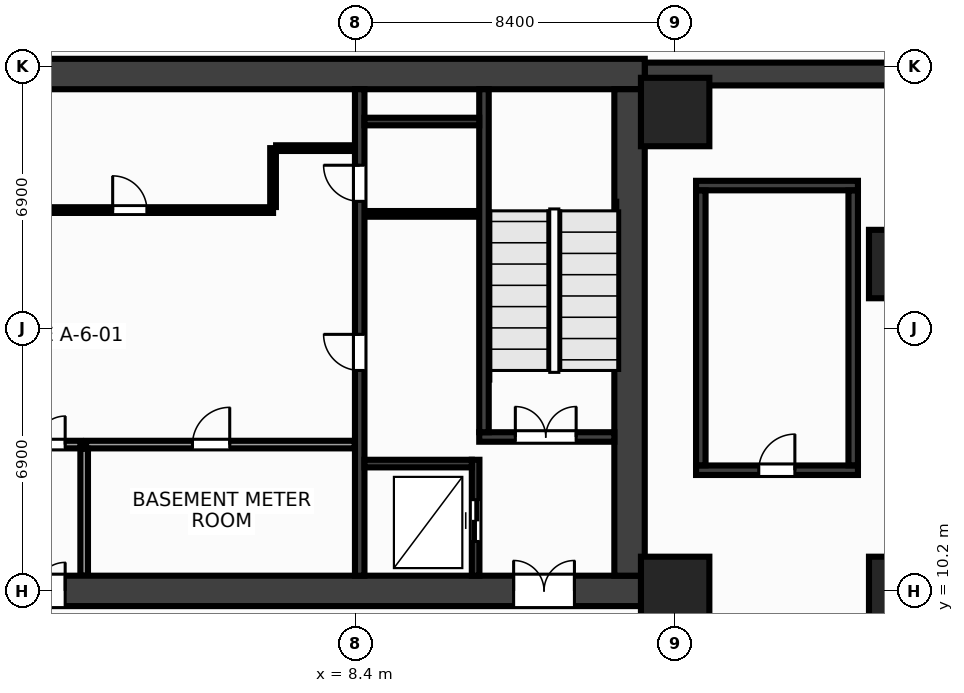
"""IFC4 building model, lengths in metres.
Left out: names, types, materials, properties, quantities, classifications, styles, units other than length and angle.
Written with IfcOpenShell. Run it as: python <this file> out.ifc"""

import sys

from ifc_helpers import new_model, si_unit, direction, frame, frame_2d, origin, origin_2d, place, context, subcontext, project, spatial, rectangle, extrude, source, transform, mapped, element, fill, save


model = new_model("IFC4")
c1 = context("Model", 3, precision=1e-05, world=origin(), true_north=direction((0.0, 1.0)))
c2 = subcontext(c1, "Body", "Model", "MODEL_VIEW")
j1 = project(units=[si_unit("LENGTHUNIT", "METRE"), si_unit("PLANEANGLEUNIT", "RADIAN")], contexts=[c1])
p1 = place(None, origin())
s1 = spatial("IfcSite", under=j1, at=p1, CompositionType="ELEMENT")
p2 = place(p1, origin())
s2 = spatial("IfcBuilding", under=s1, at=p2, CompositionType="ELEMENT")
p3 = place(p2, frame((0.0, 0.0, -11.0)))
s3 = spatial("IfcBuildingStorey", under=s2, at=p3, CompositionType="ELEMENT", Elevation=-11.0)
m1 = source(origin(), c2, "Body", "SweptSolid", [
    extrude(rectangle(XDim=22.9, YDim=0.6, at=frame_2d((11.45, 0.0))), origin(), (0.0, 0.0, 1.0), 5.5),
])
p4 = place(p3, frame((16.0, 23.8, 0.0), z_axis=(0.0, 0.0, 1.0), x_axis=(1.0, 0.0, 0.0)))
e1 = element("IfcWall", 1, at=p4, inside=s3, PredefinedType="SHEAR", context=c2, shape_type="MappedRepresentation", body=[
    mapped(m1, transform((0.0, 0.0, 0.0), x_axis=(1.0, 0.0, 0.0), y_axis=(0.0, 1.0, 0.0), z_axis=(0.0, 0.0, 1.0), scale=1.0)),
])
m2 = source(origin(), c2, "Body", "SweptSolid", [
    extrude(rectangle(XDim=32.0, YDim=0.8, at=frame_2d((16.0, 0.0))), origin(), (0.0, 0.0, 1.0), 5.5),
])
p5 = place(p3, frame((-16.0, 23.8, 0.0), z_axis=(0.0, 0.0, 1.0), x_axis=(1.0, 0.0, 0.0)))
e2 = element("IfcWall", 2, at=p5, inside=s3, PredefinedType="SHEAR", context=c2, shape_type="MappedRepresentation", body=[
    mapped(m2, transform((0.0, 0.0, 0.0), x_axis=(1.0, 0.0, 0.0), y_axis=(0.0, 1.0, 0.0), z_axis=(0.0, 0.0, 1.0), scale=1.0)),
])
p6 = place(p3, frame((-16.0, 10.2, 0.0), z_axis=(0.0, 0.0, 1.0), x_axis=(1.0, 0.0, 0.0)))
e3 = element("IfcWall", 3, at=p6, inside=s3, PredefinedType="SHEAR", context=c2, shape_type="MappedRepresentation", body=[
    mapped(m2, transform((0.0, 0.0, 0.0), x_axis=(1.0, 0.0, 0.0), y_axis=(0.0, 1.0, 0.0), z_axis=(0.0, 0.0, 1.0), scale=1.0)),
])
p7 = place(p6, frame((1.85, 0.0, 0.0)))
e4 = element("IfcOpeningElement", 4, at=p7, cuts=e3, PredefinedType="OPENING", context=c2, shape_type="SweptSolid", body=[
    extrude(rectangle(XDim=1.6, YDim=2.15, at=frame_2d((0.8, 1.075))), frame((0.0, 0.412, 0.0), z_axis=(0.0, -1.0, 0.0), x_axis=(1.0, 0.0, 0.0)), (0.0, 0.0, 1.0), 0.824),
])
p8 = place(p6, frame((28.55, 0.0, 0.0)))
e5 = element("IfcOpeningElement", 5, at=p8, cuts=e3, PredefinedType="OPENING", context=c2, shape_type="SweptSolid", body=[
    extrude(rectangle(XDim=1.6, YDim=2.15, at=frame_2d((0.8, 1.075))), frame((0.0, 0.412, 0.0), z_axis=(0.0, -1.0, 0.0), x_axis=(1.0, 0.0, 0.0)), (0.0, 0.0, 1.0), 0.824),
])
p9 = place(p6, frame((15.25, 0.0, 0.0)))
e6 = element("IfcOpeningElement", 6, at=p9, cuts=e3, PredefinedType="OPENING", context=c2, shape_type="SweptSolid", body=[
    extrude(rectangle(XDim=1.5, YDim=2.2, at=frame_2d((0.75, 1.1))), frame((0.0, 0.412, 0.0), z_axis=(0.0, -1.0, 0.0), x_axis=(1.0, 0.0, 0.0)), (0.0, 0.0, 1.0), 0.824),
])
m3 = source(origin(), c2, "Body", "SweptSolid", [
    extrude(rectangle(XDim=12.8, YDim=0.8, at=frame_2d((6.4, 0.0))), origin(), (0.0, 0.0, 1.0), 5.5),
])
p10 = place(p3, frame((15.6, 10.6, 0.0), z_axis=(0.0, 0.0, 1.0), x_axis=(0.0, 1.0, 0.0)))
e7 = element("IfcWall", 7, at=p10, inside=s3, PredefinedType="SHEAR", context=c2, shape_type="MappedRepresentation", body=[
    mapped(m3, transform((0.0, 0.0, 0.0), x_axis=(1.0, 0.0, 0.0), y_axis=(0.0, 1.0, 0.0), z_axis=(0.0, 0.0, 1.0), scale=1.0)),
])
m4 = source(origin(), c2, "Body", "SweptSolid", [
    extrude(rectangle(XDim=12.8, YDim=0.25, at=frame_2d((6.4, 0.0))), origin(), (0.0, 0.0, 1.0), 5.5),
])
p11 = place(p3, frame((8.5, 10.6, 0.0), z_axis=(0.0, 0.0, 1.0), x_axis=(0.0, 1.0, 0.0)))
e8 = element("IfcWall", 8, at=p11, inside=s3, PredefinedType="SHEAR", context=c2, shape_type="MappedRepresentation", body=[
    mapped(m4, transform((0.0, 0.0, 0.0), x_axis=(1.0, 0.0, 0.0), y_axis=(0.0, 1.0, 0.0), z_axis=(0.0, 0.0, 1.0), scale=1.0)),
])
p12 = place(p11, frame((5.4, 0.0, 0.0)))
e9 = element("IfcOpeningElement", 9, at=p12, cuts=e8, PredefinedType="OPENING", context=c2, shape_type="SweptSolid", body=[
    extrude(rectangle(XDim=0.95, YDim=2.15, at=frame_2d((0.475, 1.075))), frame((0.0, 0.137, 0.0), z_axis=(0.0, -1.0, 0.0), x_axis=(1.0, 0.0, 0.0)), (0.0, 0.0, 1.0), 0.274),
])
p13 = place(p11, frame((9.85, 0.0, 0.0)))
e10 = element("IfcOpeningElement", 10, at=p13, cuts=e8, PredefinedType="OPENING", context=c2, shape_type="SweptSolid", body=[
    extrude(rectangle(XDim=0.95, YDim=2.15, at=frame_2d((0.475, 1.075))), frame((0.0, 0.137, 0.0), z_axis=(0.0, -1.0, 0.0), x_axis=(1.0, 0.0, 0.0)), (0.0, 0.0, 1.0), 0.274),
])
m5 = source(origin(), c2, "Body", "SweptSolid", [
    extrude(rectangle(XDim=3.555, YDim=0.25, at=frame_2d((1.777, 0.0))), origin(), (0.0, 0.0, 1.0), 5.5),
])
p14 = place(p3, frame((11.645, 14.25, 0.0), z_axis=(0.0, 0.0, 1.0), x_axis=(1.0, 0.0, 0.0)))
e11 = element("IfcWall", 11, at=p14, inside=s3, PredefinedType="SHEAR", context=c2, shape_type="MappedRepresentation", body=[
    mapped(m5, transform((0.0, 0.0, 0.0), x_axis=(1.0, 0.0, 0.0), y_axis=(0.0, 1.0, 0.0), z_axis=(0.0, 0.0, 1.0), scale=1.0)),
])
p15 = place(p14, frame((0.95, 0.0, 0.0)))
e12 = element("IfcOpeningElement", 12, at=p15, cuts=e11, PredefinedType="OPENING", context=c2, shape_type="SweptSolid", body=[
    extrude(rectangle(XDim=1.6, YDim=2.15, at=frame_2d((0.8, 1.075))), frame((0.0, 0.137, 0.0), z_axis=(0.0, -1.0, 0.0), x_axis=(1.0, 0.0, 0.0)), (0.0, 0.0, 1.0), 0.274),
])
m6 = source(origin(), c2, "Body", "SweptSolid", [
    extrude(rectangle(XDim=9.025, YDim=0.25, at=frame_2d((4.512, 0.0))), origin(), (0.0, 0.0, 1.0), 5.5),
])
p16 = place(p3, frame((11.77, 14.375, 0.0), z_axis=(0.0, 0.0, 1.0), x_axis=(0.0, 1.0, 0.0)))
e13 = element("IfcWall", 13, at=p16, inside=s3, PredefinedType="SHEAR", context=c2, shape_type="MappedRepresentation", body=[
    mapped(m6, transform((0.0, 0.0, 0.0), x_axis=(1.0, 0.0, 0.0), y_axis=(0.0, 1.0, 0.0), z_axis=(0.0, 0.0, 1.0), scale=1.0)),
])
m7 = source(origin(), c2, "Body", "SweptSolid", [
    extrude(rectangle(XDim=3.05, YDim=0.2, at=frame_2d((1.525, 0.0))), origin(), (0.0, 0.0, 1.0), 5.5),
])
p17 = place(p3, frame((11.55, 10.6, 0.0), z_axis=(0.0, 0.0, 1.0), x_axis=(0.0, 1.0, 0.0)))
e14 = element("IfcWall", 14, at=p17, inside=s3, PredefinedType="SHEAR", context=c2, shape_type="MappedRepresentation", body=[
    mapped(m7, transform((0.0, 0.0, 0.0), x_axis=(1.0, 0.0, 0.0), y_axis=(0.0, 1.0, 0.0), z_axis=(0.0, 0.0, 1.0), scale=1.0)),
])
p18 = place(p17, frame((0.9, 0.0, 0.0)))
e15 = element("IfcOpeningElement", 15, at=p18, cuts=e14, PredefinedType="OPENING", context=c2, shape_type="SweptSolid", body=[
    extrude(rectangle(XDim=1.1, YDim=2.15, at=frame_2d((0.55, 1.075))), frame((0.0, 0.112, 0.0), z_axis=(0.0, -1.0, 0.0), x_axis=(1.0, 0.0, 0.0)), (0.0, 0.0, 1.0), 0.224),
])
m8 = source(origin(), c2, "Body", "SweptSolid", [
    extrude(rectangle(XDim=2.825, YDim=0.2, at=frame_2d((1.413, 0.0))), origin(), (0.0, 0.0, 1.0), 5.5),
])
p19 = place(p3, frame((8.625, 13.55, 0.0), z_axis=(0.0, 0.0, 1.0), x_axis=(1.0, 0.0, 0.0)))
e16 = element("IfcWall", 16, at=p19, inside=s3, PredefinedType="SHEAR", context=c2, shape_type="MappedRepresentation", body=[
    mapped(m8, transform((0.0, 0.0, 0.0), x_axis=(1.0, 0.0, 0.0), y_axis=(0.0, 1.0, 0.0), z_axis=(0.0, 0.0, 1.0), scale=1.0)),
])
m9 = source(origin(), c2, "Body", "SweptSolid", [
    extrude(rectangle(XDim=3.02, YDim=0.2, at=frame_2d((1.51, 0.0))), origin(), (0.0, 0.0, 1.0), 5.5),
])
p20 = place(p3, frame((8.625, 22.55, 0.0), z_axis=(0.0, 0.0, 1.0), x_axis=(1.0, 0.0, 0.0)))
e17 = element("IfcWall", 17, at=p20, inside=s3, PredefinedType="SHEAR", context=c2, shape_type="MappedRepresentation", body=[
    mapped(m9, transform((0.0, 0.0, 0.0), x_axis=(1.0, 0.0, 0.0), y_axis=(0.0, 1.0, 0.0), z_axis=(0.0, 0.0, 1.0), scale=1.0)),
])
m10 = source(origin(), c2, "Body", "SweptSolid", [
    extrude(rectangle(XDim=4.26, YDim=0.25, at=frame_2d((2.13, 0.0))), origin(), (0.0, 0.0, 1.0), 5.5),
])
p21 = place(p3, frame((17.35, 20.865, 0.0), z_axis=(0.0, 0.0, 1.0), x_axis=(1.0, 0.0, 0.0)))
e18 = element("IfcWall", 18, at=p21, inside=s3, PredefinedType="SHEAR", context=c2, shape_type="MappedRepresentation", body=[
    mapped(m10, transform((0.0, 0.0, 0.0), x_axis=(1.0, 0.0, 0.0), y_axis=(0.0, 1.0, 0.0), z_axis=(0.0, 0.0, 1.0), scale=1.0)),
])
p22 = place(p3, frame((17.35, 13.375, 0.0), z_axis=(0.0, 0.0, 1.0), x_axis=(1.0, 0.0, 0.0)))
e19 = element("IfcWall", 19, at=p22, inside=s3, PredefinedType="SHEAR", context=c2, shape_type="MappedRepresentation", body=[
    mapped(m10, transform((0.0, 0.0, 0.0), x_axis=(1.0, 0.0, 0.0), y_axis=(0.0, 1.0, 0.0), z_axis=(0.0, 0.0, 1.0), scale=1.0)),
])
p23 = place(p22, frame((1.65, 0.0, 0.0)))
e20 = element("IfcOpeningElement", 20, at=p23, cuts=e19, PredefinedType="OPENING", context=c2, shape_type="SweptSolid", body=[
    extrude(rectangle(XDim=0.95, YDim=2.15, at=frame_2d((0.475, 1.075))), frame((0.0, 0.137, 0.0), z_axis=(0.0, -1.0, 0.0), x_axis=(1.0, 0.0, 0.0)), (0.0, 0.0, 1.0), 0.274),
])
m11 = source(origin(), c2, "Body", "SweptSolid", [
    extrude(rectangle(XDim=7.23, YDim=0.25, at=frame_2d((3.615, 0.0))), origin(), (0.0, 0.0, 1.0), 5.5),
])
for number, where, z_axis, x_axis in (
    (21, (17.475, 13.505, 0.0), (0.0, 0.0, 1.0), (0.0, 1.0, 0.0)),
    (22, (21.485, 13.505, 0.0), (0.0, 0.0, 1.0), (0.0, 1.0, 0.0)),
):
    element("IfcWall", number, at=place(p3, frame(where, z_axis=z_axis, x_axis=x_axis)), inside=s3, PredefinedType="SHEAR", context=c2, shape_type="MappedRepresentation", body=[
        mapped(m11, transform((0.0, 0.0, 0.0), x_axis=(1.0, 0.0, 0.0), y_axis=(0.0, 1.0, 0.0), z_axis=(0.0, 0.0, 1.0), scale=1.0)),
    ])
m12 = source(origin(), c2, "Body", "SweptSolid", [
    extrude(rectangle(XDim=1.8, YDim=1.8, at=origin_2d()), origin(), (0.0, 0.0, 1.0), 5.5),
])
for number, where, z_axis, x_axis in (
    (23, (16.8, 10.2, 0.0), (0.0, 0.0, 1.0), (1.0, 0.0, 0.0)),
    (24, (16.8, 22.8, 0.0), (0.0, 0.0, 1.0), (1.0, 0.0, 0.0)),
    (25, (22.8, 10.2, 0.0), (0.0, 0.0, 1.0), (1.0, 0.0, 0.0)),
    (26, (22.8, 18.8, 0.0), (0.0, 0.0, 1.0), (1.0, 0.0, 0.0)),
):
    element("IfcColumn", number, at=place(p3, frame(where, z_axis=z_axis, x_axis=x_axis)), inside=s3, PredefinedType="COLUMN", context=c2, shape_type="MappedRepresentation", body=[
        mapped(m12, transform((0.0, 0.0, 0.0), x_axis=(1.0, 0.0, 0.0), y_axis=(0.0, 1.0, 0.0), z_axis=(0.0, 0.0, 1.0), scale=1.0)),
    ])
m13 = source(origin(), c2, "Body", "SweptSolid", [
    extrude(rectangle(XDim=3.01, YDim=0.15, at=frame_2d((1.505, 0.0))), origin(), (0.0, 0.0, 1.0), 5.15),
])
p24 = place(p3, frame((8.63, 20.12, 0.0), z_axis=(0.0, 0.0, 1.0), x_axis=(1.0, 0.0, 0.0)))
e27 = element("IfcWall", 27, at=p24, inside=s3, PredefinedType="PARTITIONING", context=c2, shape_type="MappedRepresentation", body=[
    mapped(m13, transform((0.0, 0.0, 0.0), x_axis=(1.0, 0.0, 0.0), y_axis=(0.0, 1.0, 0.0), z_axis=(0.0, 0.0, 1.0), scale=1.0)),
])
m14 = source(origin(), c2, "Body", "SweptSolid", [
    extrude(rectangle(XDim=7.07, YDim=0.2, at=frame_2d((3.535, 0.0))), origin(), (0.0, 0.0, 1.0), 5.15),
])
p25 = place(p3, frame((1.3, 14.05, 0.0), z_axis=(0.0, 0.0, 1.0), x_axis=(1.0, 0.0, 0.0)))
e28 = element("IfcWall", 28, at=p25, inside=s3, PredefinedType="PARTITIONING", context=c2, shape_type="MappedRepresentation", body=[
    mapped(m14, transform((0.0, 0.0, 0.0), x_axis=(1.0, 0.0, 0.0), y_axis=(0.0, 1.0, 0.0), z_axis=(0.0, 0.0, 1.0), scale=1.0)),
])
p26 = place(p25, frame((2.8, 0.0, 0.0)))
e29 = element("IfcOpeningElement", 29, at=p26, cuts=e28, PredefinedType="OPENING", context=c2, shape_type="SweptSolid", body=[
    extrude(rectangle(XDim=0.98, YDim=2.15, at=frame_2d((0.49, 1.075))), frame((0.0, 0.112, 0.0), z_axis=(0.0, -1.0, 0.0), x_axis=(1.0, 0.0, 0.0)), (0.0, 0.0, 1.0), 0.224),
])
m15 = source(origin(), c2, "Body", "SweptSolid", [
    extrude(rectangle(XDim=3.34, YDim=0.2, at=frame_2d((1.67, 0.0))), origin(), (0.0, 0.0, 1.0), 5.15),
])
p27 = place(p3, frame((1.25, 10.6, 0.0), z_axis=(0.0, 0.0, 1.0), x_axis=(0.0, 1.0, 0.0)))
e30 = element("IfcWall", 30, at=p27, inside=s3, PredefinedType="PARTITIONING", context=c2, shape_type="MappedRepresentation", body=[
    mapped(m15, transform((0.0, 0.0, 0.0), x_axis=(1.0, 0.0, 0.0), y_axis=(0.0, 1.0, 0.0), z_axis=(0.0, 0.0, 1.0), scale=1.0)),
])
m16 = source(origin(), c2, "Body", "SweptSolid", [
    extrude(rectangle(XDim=2.3, YDim=0.2, at=frame_2d((1.15, 0.0))), origin(), (0.0, 0.0, 1.0), 5.15),
])
p28 = place(p3, frame((-1.15, 14.05, 0.0), z_axis=(0.0, 0.0, 1.0), x_axis=(1.0, 0.0, 0.0)))
e31 = element("IfcWall", 31, at=p28, inside=s3, PredefinedType="PARTITIONING", context=c2, shape_type="MappedRepresentation", body=[
    mapped(m16, transform((0.0, 0.0, 0.0), x_axis=(1.0, 0.0, 0.0), y_axis=(0.0, 1.0, 0.0), z_axis=(0.0, 0.0, 1.0), scale=1.0)),
])
p29 = place(p28, frame((0.4, 0.0, 0.0)))
e32 = element("IfcOpeningElement", 32, at=p29, cuts=e31, PredefinedType="OPENING", context=c2, shape_type="SweptSolid", body=[
    extrude(rectangle(XDim=1.5, YDim=2.2, at=frame_2d((0.75, 1.1))), frame((0.0, 0.112, 0.0), z_axis=(0.0, -1.0, 0.0), x_axis=(1.0, 0.0, 0.0)), (0.0, 0.0, 1.0), 0.224),
])
m17 = source(origin(), c2, "Body", "SweptSolid", [
    extrude(rectangle(XDim=14.59, YDim=0.15, at=frame_2d((7.295, 0.0))), origin(), (0.0, 0.0, 1.0), 5.15),
])
p30 = place(p3, frame((-8.37, 20.22, 0.0), z_axis=(0.0, 0.0, 1.0), x_axis=(1.0, 0.0, 0.0)))
e33 = element("IfcWall", 33, at=p30, inside=s3, PredefinedType="PARTITIONING", context=c2, shape_type="MappedRepresentation", body=[
    mapped(m17, transform((0.0, 0.0, 0.0), x_axis=(1.0, 0.0, 0.0), y_axis=(0.0, 1.0, 0.0), z_axis=(0.0, 0.0, 1.0), scale=1.0)),
])
p31 = place(p30, frame((1.36, 0.0, 0.0)))
e34 = element("IfcOpeningElement", 34, at=p31, cuts=e33, PredefinedType="OPENING", context=c2, shape_type="SweptSolid", body=[
    extrude(rectangle(XDim=0.9, YDim=2.15, at=frame_2d((0.45, 1.075))), frame((0.0, 0.087, 0.0), z_axis=(0.0, -1.0, 0.0), x_axis=(1.0, 0.0, 0.0)), (0.0, 0.0, 1.0), 0.174),
])
p32 = place(p30, frame((4.92, 0.0, 0.0)))
e35 = element("IfcOpeningElement", 35, at=p32, cuts=e33, PredefinedType="OPENING", context=c2, shape_type="SweptSolid", body=[
    extrude(rectangle(XDim=0.9, YDim=2.15, at=frame_2d((0.45, 1.075))), frame((0.0, 0.087, 0.0), z_axis=(0.0, -1.0, 0.0), x_axis=(1.0, 0.0, 0.0)), (0.0, 0.0, 1.0), 0.174),
])
p33 = place(p30, frame((10.37, 0.0, 0.0)))
e36 = element("IfcOpeningElement", 36, at=p33, cuts=e33, PredefinedType="OPENING", context=c2, shape_type="SweptSolid", body=[
    extrude(rectangle(XDim=0.9, YDim=2.15, at=frame_2d((0.45, 1.075))), frame((0.0, 0.087, 0.0), z_axis=(0.0, -1.0, 0.0), x_axis=(1.0, 0.0, 0.0)), (0.0, 0.0, 1.0), 0.174),
])
m18 = source(origin(), c2, "Body", "SweptSolid", [
    extrude(rectangle(XDim=1.55, YDim=0.15, at=frame_2d((0.775, 0.0))), origin(), (0.0, 0.0, 1.0), 5.15),
])
p34 = place(p3, frame((6.22, 20.3, 0.0), z_axis=(0.0, 0.0, 1.0), x_axis=(0.0, 1.0, 0.0)))
e37 = element("IfcWall", 37, at=p34, inside=s3, PredefinedType="PARTITIONING", context=c2, shape_type="MappedRepresentation", body=[
    mapped(m18, transform((0.0, 0.0, 0.0), x_axis=(1.0, 0.0, 0.0), y_axis=(0.0, 1.0, 0.0), z_axis=(0.0, 0.0, 1.0), scale=1.0)),
])
m19 = source(origin(), c2, "Body", "SweptSolid", [
    extrude(rectangle(XDim=2.07, YDim=0.15, at=frame_2d((1.035, 0.0))), origin(), (0.0, 0.0, 1.0), 5.15),
])
p35 = place(p3, frame((6.3, 21.85, 0.0), z_axis=(0.0, 0.0, 1.0), x_axis=(1.0, 0.0, 0.0)))
e38 = element("IfcWall", 38, at=p35, inside=s3, PredefinedType="PARTITIONING", context=c2, shape_type="MappedRepresentation", body=[
    mapped(m19, transform((0.0, 0.0, 0.0), x_axis=(1.0, 0.0, 0.0), y_axis=(0.0, 1.0, 0.0), z_axis=(0.0, 0.0, 1.0), scale=1.0)),
])
m20 = source(origin(), c2, "Body", "SweptSolid", [
    extrude(rectangle(XDim=1.6, YDim=2.15, at=frame_2d((0.8, 1.075))), frame((0.0, 0.025, 0.0), z_axis=(0.0, -1.0, 0.0), x_axis=(1.0, 0.0, 0.0)), (0.0, 0.0, 1.0), 0.05),
])
p36 = place(p15, origin())
e39 = element("IfcDoor", 39, at=p36, inside=s3, OperationType="DOUBLE_DOOR_SINGLE_SWING", PredefinedType="DOOR", context=c2, shape_type="MappedRepresentation", body=[
    mapped(m20, transform((0.0, 0.0, 0.0), x_axis=(1.0, 0.0, 0.0), y_axis=(0.0, 1.0, 0.0), z_axis=(0.0, 0.0, 1.0), scale=1.0)),
])
fill(e12, e39)
p37 = place(p8, origin())
e40 = element("IfcDoor", 40, at=p37, inside=s3, OperationType="DOUBLE_DOOR_SINGLE_SWING", PredefinedType="DOOR", context=c2, shape_type="MappedRepresentation", body=[
    mapped(m20, transform((0.0, 0.0, 0.0), x_axis=(1.0, 0.0, 0.0), y_axis=(0.0, 1.0, 0.0), z_axis=(0.0, 0.0, 1.0), scale=1.0)),
])
fill(e5, e40)
m21 = source(origin(), c2, "Body", "SweptSolid", [
    extrude(rectangle(XDim=1.1, YDim=2.15, at=frame_2d((0.55, 1.075))), frame((0.0, 0.025, 0.0), z_axis=(0.0, -1.0, 0.0), x_axis=(1.0, 0.0, 0.0)), (0.0, 0.0, 1.0), 0.05),
])
p38 = place(p18, origin())
e41 = element("IfcDoor", 41, at=p38, inside=s3, OperationType="DOUBLE_DOOR_SLIDING", PredefinedType="DOOR", context=c2, shape_type="MappedRepresentation", body=[
    mapped(m21, transform((0.0, 0.0, 0.0), x_axis=(1.0, 0.0, 0.0), y_axis=(0.0, 1.0, 0.0), z_axis=(0.0, 0.0, 1.0), scale=1.0)),
])
fill(e15, e41)
m22 = source(origin(), c2, "Body", "SweptSolid", [
    extrude(rectangle(XDim=0.95, YDim=2.15, at=frame_2d((0.475, 1.075))), frame((0.0, 0.025, 0.0), z_axis=(0.0, -1.0, 0.0), x_axis=(1.0, 0.0, 0.0)), (0.0, 0.0, 1.0), 0.05),
])
p39 = place(p23, origin())
e42 = element("IfcDoor", 42, at=p39, inside=s3, OperationType="SINGLE_SWING_RIGHT", PredefinedType="DOOR", context=c2, shape_type="MappedRepresentation", body=[
    mapped(m22, transform((0.0, 0.0, 0.0), x_axis=(1.0, 0.0, 0.0), y_axis=(0.0, 1.0, 0.0), z_axis=(0.0, 0.0, 1.0), scale=1.0)),
])
fill(e20, e42)
p40 = place(p12, origin())
e43 = element("IfcDoor", 43, at=p40, inside=s3, OperationType="SINGLE_SWING_RIGHT", PredefinedType="DOOR", context=c2, shape_type="MappedRepresentation", body=[
    mapped(m22, transform((0.0, 0.0, 0.0), x_axis=(1.0, 0.0, 0.0), y_axis=(0.0, 1.0, 0.0), z_axis=(0.0, 0.0, 1.0), scale=1.0)),
])
fill(e9, e43)
m23 = source(origin(), c2, "Body", "SweptSolid", [
    extrude(rectangle(XDim=0.95, YDim=2.15, at=frame_2d((0.475, 1.075))), frame((0.0, 0.025, 0.0), z_axis=(0.0, -1.0, 0.0), x_axis=(1.0, 0.0, 0.0)), (0.0, 0.0, 1.0), 0.05),
])
p41 = place(p13, origin())
e44 = element("IfcDoor", 44, at=p41, inside=s3, OperationType="SINGLE_SWING_RIGHT", PredefinedType="DOOR", context=c2, shape_type="MappedRepresentation", body=[
    mapped(m23, transform((0.0, 0.0, 0.0), x_axis=(1.0, 0.0, 0.0), y_axis=(0.0, 1.0, 0.0), z_axis=(0.0, 0.0, 1.0), scale=1.0)),
])
fill(e10, e44)
m24 = source(origin(), c2, "Body", "SweptSolid", [
    extrude(rectangle(XDim=0.98, YDim=2.15, at=frame_2d((0.49, 1.075))), frame((0.0, 0.025, 0.0), z_axis=(0.0, -1.0, 0.0), x_axis=(1.0, 0.0, 0.0)), (0.0, 0.0, 1.0), 0.05),
])
p42 = place(p26, origin())
e45 = element("IfcDoor", 45, at=p42, inside=s3, OperationType="SINGLE_SWING_RIGHT", PredefinedType="DOOR", context=c2, shape_type="MappedRepresentation", body=[
    mapped(m24, transform((0.0, 0.0, 0.0), x_axis=(1.0, 0.0, 0.0), y_axis=(0.0, 1.0, 0.0), z_axis=(0.0, 0.0, 1.0), scale=1.0)),
])
fill(e29, e45)
m25 = source(origin(), c2, "Body", "SweptSolid", [
    extrude(rectangle(XDim=1.5, YDim=2.2, at=frame_2d((0.75, 1.1))), frame((0.0, 0.025, 0.0), z_axis=(0.0, -1.0, 0.0), x_axis=(1.0, 0.0, 0.0)), (0.0, 0.0, 1.0), 0.05),
])
p43 = place(p29, origin())
e46 = element("IfcDoor", 46, at=p43, inside=s3, OperationType="DOUBLE_DOOR_SINGLE_SWING", PredefinedType="DOOR", context=c2, shape_type="MappedRepresentation", body=[
    mapped(m25, transform((0.0, 0.0, 0.0), x_axis=(1.0, 0.0, 0.0), y_axis=(0.0, 1.0, 0.0), z_axis=(0.0, 0.0, 1.0), scale=1.0)),
])
fill(e32, e46)
p44 = place(p9, origin())
e47 = element("IfcDoor", 47, at=p44, inside=s3, OperationType="DOUBLE_DOOR_SINGLE_SWING", PredefinedType="DOOR", context=c2, shape_type="MappedRepresentation", body=[
    mapped(m25, transform((0.0, 0.0, 0.0), x_axis=(1.0, 0.0, 0.0), y_axis=(0.0, 1.0, 0.0), z_axis=(0.0, 0.0, 1.0), scale=1.0)),
])
fill(e6, e47)
m26 = source(origin(), c2, "Body", "SweptSolid", [
    extrude(rectangle(XDim=0.9, YDim=2.15, at=frame_2d((0.45, 1.075))), frame((0.0, 0.025, 0.0), z_axis=(0.0, -1.0, 0.0), x_axis=(1.0, 0.0, 0.0)), (0.0, 0.0, 1.0), 0.05),
])
p45 = place(p33, origin())
e48 = element("IfcDoor", 48, at=p45, inside=s3, OperationType="SINGLE_SWING_LEFT", PredefinedType="DOOR", context=c2, shape_type="MappedRepresentation", body=[
    mapped(m26, transform((0.0, 0.0, 0.0), x_axis=(1.0, 0.0, 0.0), y_axis=(0.0, 1.0, 0.0), z_axis=(0.0, 0.0, 1.0), scale=1.0)),
])
fill(e36, e48)
save(model, sys.argv[1])
